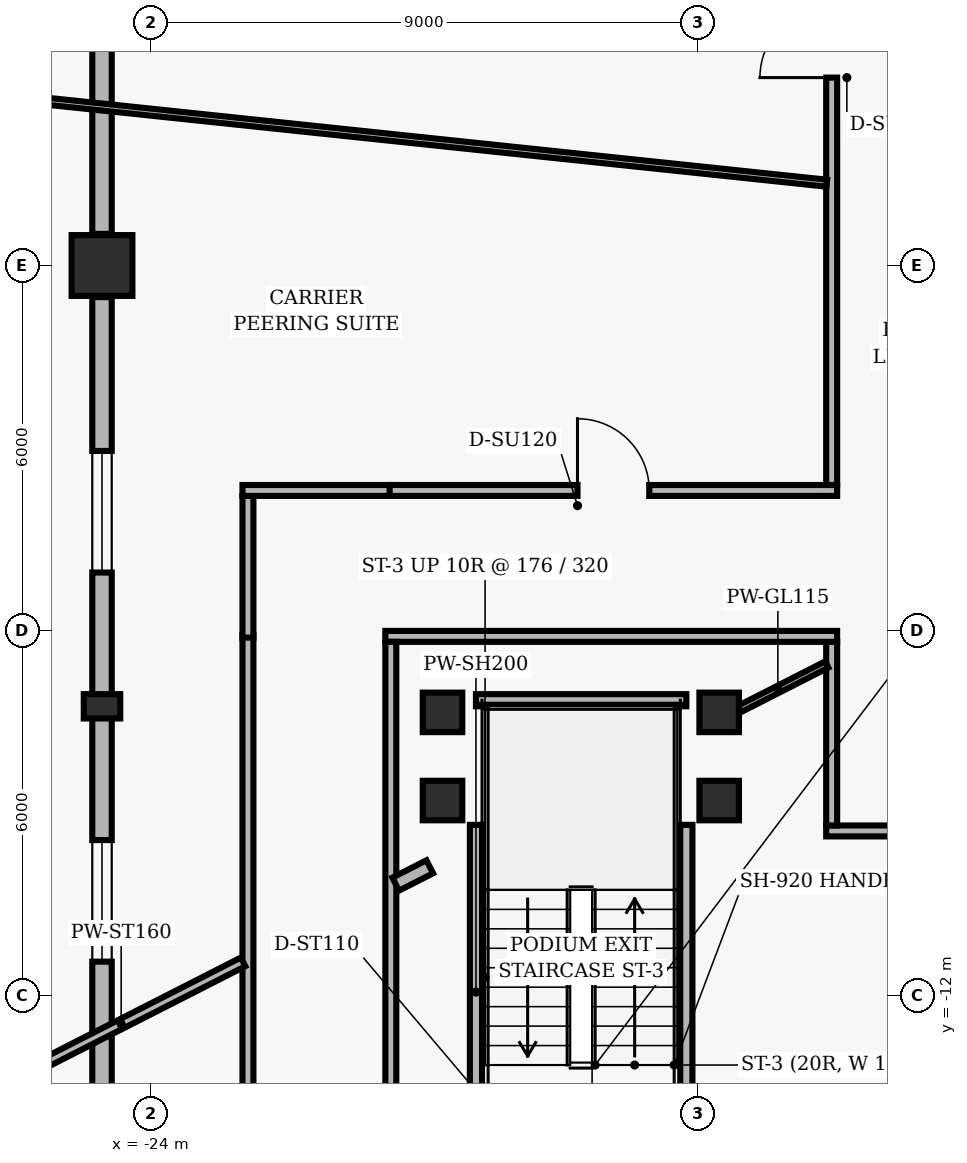
"""IFC4 building model, lengths in metres.
Left out: names, types, materials, properties, quantities, classifications, styles, units other than length and angle.
Written with IfcOpenShell. Run it as: python <this file> out.ifc"""

import sys

from ifc_helpers import new_model, si_unit, direction, frame, frame_2d, origin, origin_2d, place, context, subcontext, project, spatial, rectangle, extrude, element, fill, save


model = new_model("IFC4")
c1 = context("Model", 3, precision=1e-05, world=origin(), true_north=direction((0.0, 1.0)))
c2 = subcontext(c1, "Body", "Model", "MODEL_VIEW")
j1 = project(units=[si_unit("LENGTHUNIT", "METRE"), si_unit("PLANEANGLEUNIT", "RADIAN")], contexts=[c1])
p1 = place(None, origin())
s1 = spatial("IfcSite", under=j1, at=p1, CompositionType="ELEMENT")
p2 = place(p1, origin())
s2 = spatial("IfcBuilding", under=s1, at=p2, CompositionType="ELEMENT")
p3 = place(p2, frame((0.0, 0.0, 4.8)))
s3 = spatial("IfcBuildingStorey", under=s2, at=p3, CompositionType="ELEMENT", Elevation=4.8)
p4 = place(p3, frame((-24.8, 0.0, 0.0), z_axis=(0.0, 0.0, 1.0), x_axis=(1.0, 0.0, 0.0)))
e1 = element("IfcColumn", 1, at=p4, inside=s3, PredefinedType="COLUMN", context=c2, shape_type="SweptSolid", body=[
    extrude(rectangle(XDim=1.0, YDim=1.0, at=origin_2d()), origin(), (0.0, 0.0, 1.0), 3.52),
])
for number, where, z_axis, x_axis in (
    (2, (-19.2, -8.8, 0.0), (0.0, 0.0, 1.0), (1.0, 0.0, 0.0)),
    (3, (-14.65, -8.8, 0.0), (0.0, 0.0, 1.0), (1.0, 0.0, 0.0)),
    (4, (-19.2, -7.35, 0.0), (0.0, 0.0, 1.0), (1.0, 0.0, 0.0)),
    (5, (-14.65, -7.35, 0.0), (0.0, 0.0, 1.0), (1.0, 0.0, 0.0)),
):
    element("IfcColumn", number, at=place(p3, frame(where, z_axis=z_axis, x_axis=x_axis)), inside=s3, PredefinedType="COLUMN", context=c2, shape_type="SweptSolid", body=[
        extrude(rectangle(XDim=0.65, YDim=0.65, at=origin_2d()), origin(), (0.0, 0.0, 1.0), 3.52),
    ])
p5 = place(p3, frame((-24.8, -7.25, 0.0), z_axis=(0.0, 0.0, 1.0), x_axis=(1.0, 0.0, 0.0)))
e6 = element("IfcColumn", 6, at=p5, inside=s3, PredefinedType="PILASTER", context=c2, shape_type="SweptSolid", body=[
    extrude(rectangle(XDim=0.6, YDim=0.4, at=origin_2d()), origin(), (0.0, 0.0, 1.0), 3.52),
])
p6 = place(p3, frame((-24.8, 0.52, 0.0), z_axis=(0.0, 0.0, 1.0), x_axis=(0.0, 1.0, 0.0)))
e7 = element("IfcWall", 7, at=p6, inside=s3, PredefinedType="SOLIDWALL", context=c2, shape_type="SweptSolid", body=[
    extrude(rectangle(XDim=13.46, YDim=0.32, at=frame_2d((6.73, 0.0))), origin(), (0.0, 0.0, 1.0), 2.261),
])
p7 = place(p3, frame((-24.8, -13.98, 0.0), z_axis=(0.0, 0.0, 1.0), x_axis=(0.0, 1.0, 0.0)))
e8 = element("IfcWall", 8, at=p7, inside=s3, PredefinedType="SOLIDWALL", context=c2, shape_type="SweptSolid", body=[
    extrude(rectangle(XDim=13.46, YDim=0.32, at=frame_2d((6.73, 0.0))), origin(), (0.0, 0.0, 1.0), 2.588),
])
p8 = place(p7, frame((2.53, 0.0, 0.65)))
e9 = element("IfcOpeningElement", 9, at=p8, cuts=e8, PredefinedType="OPENING", context=c2, shape_type="SweptSolid", body=[
    extrude(rectangle(XDim=2.0, YDim=1.6, at=frame_2d((1.0, 0.8))), frame((0.0, 0.17, 0.0), z_axis=(0.0, -1.0, 0.0), x_axis=(1.0, 0.0, 0.0)), (0.0, 0.0, 1.0), 0.34),
])
p9 = place(p7, frame((8.93, 0.0, 0.65)))
e10 = element("IfcOpeningElement", 10, at=p9, cuts=e8, PredefinedType="OPENING", context=c2, shape_type="SweptSolid", body=[
    extrude(rectangle(XDim=2.0, YDim=1.6, at=frame_2d((1.0, 0.8))), frame((0.0, 0.17, 0.0), z_axis=(0.0, -1.0, 0.0), x_axis=(1.0, 0.0, 0.0)), (0.0, 0.0, 1.0), 0.34),
])
for number, where, z_axis, x_axis in (
    (11, (-18.65, -14.7, 0.0), (0.0, 0.0, 1.0), (0.0, 1.0, 0.0)),
    (12, (-15.19, -14.7, 0.0), (0.0, 0.0, 1.0), (0.0, 1.0, 0.0)),
):
    element("IfcWall", number, at=place(p3, frame(where, z_axis=z_axis, x_axis=x_axis)), inside=s3, PredefinedType="PARTITIONING", context=c2, shape_type="SweptSolid", body=[
        extrude(rectangle(XDim=5.5, YDim=0.2, at=frame_2d((2.75, 0.0))), origin(), (0.0, 0.0, 1.0), 3.193),
    ])
p10 = place(p3, frame((-18.65, -7.15, 0.0), z_axis=(0.0, 0.0, 1.0), x_axis=(1.0, 0.0, 0.0)))
e13 = element("IfcWall", 13, at=p10, inside=s3, PredefinedType="PARTITIONING", context=c2, shape_type="SweptSolid", body=[
    extrude(rectangle(XDim=3.46, YDim=0.2, at=frame_2d((1.73, 0.0))), origin(), (0.0, 0.0, 1.0), 1.3),
])
p11 = place(p3, frame((-22.4, -14.82, 0.0), z_axis=(0.0, 0.0, 1.0), x_axis=(0.0, 1.0, 0.0)))
e14 = element("IfcWall", 14, at=p11, inside=s3, PredefinedType="PARTITIONING", context=c2, shape_type="SweptSolid", body=[
    extrude(rectangle(XDim=8.74, YDim=0.18, at=frame_2d((4.37, 0.0))), origin(), (0.0, 0.0, 1.0), 3.193),
])
p12 = place(p3, frame((-22.4, -6.12, 0.0), z_axis=(0.0, 0.0, 1.0), x_axis=(0.0, 1.0, 0.0)))
e15 = element("IfcWall", 15, at=p12, inside=s3, PredefinedType="PARTITIONING", context=c2, shape_type="SweptSolid", body=[
    extrude(rectangle(XDim=2.33, YDim=0.18, at=frame_2d((1.165, 0.0))), origin(), (0.0, 0.0, 1.0), 3.193),
])
p13 = place(p3, frame((-22.49, -3.7, 0.0), z_axis=(0.0, 0.0, 1.0), x_axis=(1.0, 0.0, 0.0)))
e16 = element("IfcWall", 16, at=p13, inside=s3, PredefinedType="PARTITIONING", context=c2, shape_type="SweptSolid", body=[
    extrude(rectangle(XDim=2.46, YDim=0.18, at=frame_2d((1.23, 0.0))), origin(), (0.0, 0.0, 1.0), 3.193),
])
p14 = place(p3, frame((-20.07, -3.7, 0.0), z_axis=(0.0, 0.0, 1.0), x_axis=(1.0, 0.0, 0.0)))
e17 = element("IfcWall", 17, at=p14, inside=s3, PredefinedType="PARTITIONING", context=c2, shape_type="SweptSolid", body=[
    extrude(rectangle(XDim=7.36, YDim=0.18, at=frame_2d((3.68, 0.0))), origin(), (0.0, 0.0, 1.0), 2.246),
])
p15 = place(p14, frame((3.09, 0.0, 0.0)))
e18 = element("IfcOpeningElement", 18, at=p15, cuts=e17, PredefinedType="OPENING", context=c2, shape_type="SweptSolid", body=[
    extrude(rectangle(XDim=1.18, YDim=2.02, at=frame_2d((0.59, 1.01))), frame((0.0, 0.1, 0.0), z_axis=(0.0, -1.0, 0.0), x_axis=(1.0, 0.0, 0.0)), (0.0, 0.0, 1.0), 0.2),
])
p16 = place(p3, frame((-12.8, -3.61, 0.0), z_axis=(0.0, 0.0, 1.0), x_axis=(0.0, 1.0, 0.0)))
e19 = element("IfcWall", 19, at=p16, inside=s3, PredefinedType="PARTITIONING", context=c2, shape_type="SweptSolid", body=[
    extrude(rectangle(XDim=12.82, YDim=0.18, at=frame_2d((6.41, 0.0))), origin(), (0.0, 0.0, 1.0), 3.193),
])
p17 = place(p16, frame((6.7, 0.0, 0.0)))
e20 = element("IfcOpeningElement", 20, at=p17, cuts=e19, PredefinedType="OPENING", context=c2, shape_type="SweptSolid", body=[
    extrude(rectangle(XDim=1.18, YDim=2.02, at=frame_2d((0.59, 1.01))), frame((0.0, 0.1, 0.0), z_axis=(0.0, -1.0, 0.0), x_axis=(1.0, 0.0, 0.0)), (0.0, 0.0, 1.0), 0.2),
])
p18 = place(p3, frame((12.89, -9.3, 0.0), z_axis=(0.0, 0.0, 1.0), x_axis=(-1.0, 0.0, 0.0)))
e21 = element("IfcWall", 21, at=p18, inside=s3, PredefinedType="PARTITIONING", context=c2, shape_type="SweptSolid", body=[
    extrude(rectangle(XDim=25.78, YDim=0.18, at=frame_2d((12.89, 0.0))), origin(), (0.0, 0.0, 1.0), 2.76),
])
p19 = place(p18, frame((21.167, 0.0, 0.0)))
e22 = element("IfcOpeningElement", 22, at=p19, cuts=e21, PredefinedType="OPENING", context=c2, shape_type="SweptSolid", body=[
    extrude(rectangle(XDim=1.18, YDim=2.02, at=frame_2d((0.59, 1.01))), frame((0.0, 0.1, 0.0), z_axis=(0.0, -1.0, 0.0), x_axis=(1.0, 0.0, 0.0)), (0.0, 0.0, 1.0), 0.2),
])
p20 = place(p18, frame((14.507, 0.0, 0.0)))
e23 = element("IfcOpeningElement", 23, at=p20, cuts=e21, PredefinedType="OPENING", context=c2, shape_type="SweptSolid", body=[
    extrude(rectangle(XDim=0.96, YDim=2.02, at=frame_2d((0.48, 1.01))), frame((0.0, 0.1, 0.0), z_axis=(0.0, -1.0, 0.0), x_axis=(1.0, 0.0, 0.0)), (0.0, 0.0, 1.0), 0.2),
])
p21 = place(p18, frame((8.119, 0.0, 0.0)))
e24 = element("IfcOpeningElement", 24, at=p21, cuts=e21, PredefinedType="OPENING", context=c2, shape_type="SweptSolid", body=[
    extrude(rectangle(XDim=1.02, YDim=2.02, at=frame_2d((0.51, 1.01))), frame((0.0, 0.1, 0.0), z_axis=(0.0, -1.0, 0.0), x_axis=(1.0, 0.0, 0.0)), (0.0, 0.0, 1.0), 0.2),
])
p22 = place(p3, frame((-12.8, -9.21, 0.0), z_axis=(0.0, 0.0, 1.0), x_axis=(0.0, 1.0, 0.0)))
e25 = element("IfcWall", 25, at=p22, inside=s3, PredefinedType="PARTITIONING", context=c2, shape_type="SweptSolid", body=[
    extrude(rectangle(XDim=3.02, YDim=0.18, at=frame_2d((1.51, 0.0))), origin(), (0.0, 0.0, 1.0), 3.193),
])
p23 = place(p3, frame((-12.71, -6.1, 0.0), z_axis=(0.0, 0.0, 1.0), x_axis=(-1.0, 0.0, 0.0)))
e26 = element("IfcWall", 26, at=p23, inside=s3, PredefinedType="PARTITIONING", context=c2, shape_type="SweptSolid", body=[
    extrude(rectangle(XDim=7.43, YDim=0.18, at=frame_2d((3.715, 0.0))), origin(), (0.0, 0.0, 1.0), 3.193),
])
p24 = place(p3, frame((-20.05, -6.19, 0.0), z_axis=(0.0, 0.0, 1.0), x_axis=(0.0, -1.0, 0.0)))
e27 = element("IfcWall", 27, at=p24, inside=s3, PredefinedType="PARTITIONING", context=c2, shape_type="SweptSolid", body=[
    extrude(rectangle(XDim=8.52, YDim=0.18, at=frame_2d((4.26, 0.0))), origin(), (0.0, 0.0, 1.0), 2.246),
])
p25 = place(p3, frame((-12.88, -6.563, 0.0), z_axis=(0.0, 0.0, 1.0), x_axis=(-0.891024030563, -0.453956139908, 0.0)))
e28 = element("IfcWall", 28, at=p25, inside=s3, PredefinedType="MOVABLE", context=c2, shape_type="SweptSolid", body=[
    extrude(rectangle(XDim=1.807, YDim=0.115, at=frame_2d((0.904, 0.0))), origin(), (0.0, 0.0, 1.0), 3.193),
])
p26 = place(p3, frame((-19.41, -9.89, 0.0), z_axis=(0.0, 0.0, 1.0), x_axis=(-0.890983173506, -0.454036325121, 0.0)))
e29 = element("IfcWall", 29, at=p26, inside=s3, PredefinedType="PARTITIONING", context=c2, shape_type="SweptSolid", body=[
    extrude(rectangle(XDim=0.629, YDim=0.24, at=frame_2d((0.314, 0.0))), origin(), (0.0, 0.0, 1.0), 3.193),
])
p27 = place(p3, frame((-22.48, -11.454, 0.0), z_axis=(0.0, 0.0, 1.0), x_axis=(-0.891005547882, -0.453992415843, 0.0)))
e30 = element("IfcWall", 30, at=p27, inside=s3, PredefinedType="PARTITIONING", context=c2, shape_type="SweptSolid", body=[
    extrude(rectangle(XDim=4.5, YDim=0.16, at=frame_2d((2.25, 0.0))), origin(), (0.0, 0.0, 1.0), 3.193),
])
p28 = place(p3, frame((-5.093, -9.38, 0.0), z_axis=(0.0, 0.0, 1.0), x_axis=(-0.477152799659, -0.878820348978, 0.0)))
e31 = element("IfcWall", 31, at=p28, inside=s3, PredefinedType="MOVABLE", context=c2, shape_type="SweptSolid", body=[
    extrude(rectangle(XDim=19.981, YDim=0.115, at=frame_2d((9.991, 0.0))), origin(), (0.0, 0.0, 1.0), 3.193),
])
p29 = place(p3, frame((-12.88, 1.354, 0.0), z_axis=(0.0, 0.0, 1.0), x_axis=(-0.994522351217, 0.104524126066, 0.0)))
e32 = element("IfcWall", 32, at=p29, inside=s3, PredefinedType="MOVABLE", context=c2, shape_type="SweptSolid", body=[
    extrude(rectangle(XDim=13.685, YDim=0.115, at=frame_2d((6.843, 0.0))), origin(), (0.0, 0.0, 1.0), 3.193),
])
p30 = place(p8, origin())
e33 = element("IfcWindow", 33, at=p30, inside=s3, PartitioningType="SINGLE_PANEL", PredefinedType="WINDOW", context=c2, shape_type="SweptSolid", body=[
    extrude(rectangle(XDim=2.0, YDim=1.6, at=frame_2d((1.0, 0.8))), frame((0.0, 0.03, 0.0), z_axis=(0.0, -1.0, 0.0), x_axis=(1.0, 0.0, 0.0)), (0.0, 0.0, 1.0), 0.06),
])
fill(e9, e33)
p31 = place(p9, origin())
e34 = element("IfcWindow", 34, at=p31, inside=s3, PartitioningType="SINGLE_PANEL", PredefinedType="WINDOW", context=c2, shape_type="SweptSolid", body=[
    extrude(rectangle(XDim=2.0, YDim=1.6, at=frame_2d((1.0, 0.8))), frame((0.0, 0.03, 0.0), z_axis=(0.0, -1.0, 0.0), x_axis=(1.0, 0.0, 0.0)), (0.0, 0.0, 1.0), 0.06),
])
fill(e10, e34)
p32 = place(p15, origin())
e35 = element("IfcDoor", 35, at=p32, inside=s3, OperationType="SINGLE_SWING_LEFT", PredefinedType="DOOR", context=c2, shape_type="SweptSolid", body=[
    extrude(rectangle(XDim=1.18, YDim=2.02, at=frame_2d((0.59, 1.01))), frame((0.0, 0.025, 0.0), z_axis=(0.0, -1.0, 0.0), x_axis=(1.0, 0.0, 0.0)), (0.0, 0.0, 1.0), 0.05),
])
fill(e18, e35)
p33 = place(p17, origin())
e36 = element("IfcDoor", 36, at=p33, inside=s3, OperationType="SINGLE_SWING_LEFT", PredefinedType="DOOR", context=c2, shape_type="SweptSolid", body=[
    extrude(rectangle(XDim=1.18, YDim=2.02, at=frame_2d((0.59, 1.01))), frame((0.0, 0.025, 0.0), z_axis=(0.0, -1.0, 0.0), x_axis=(1.0, 0.0, 0.0)), (0.0, 0.0, 1.0), 0.05),
])
fill(e20, e36)
save(model, sys.argv[1])
